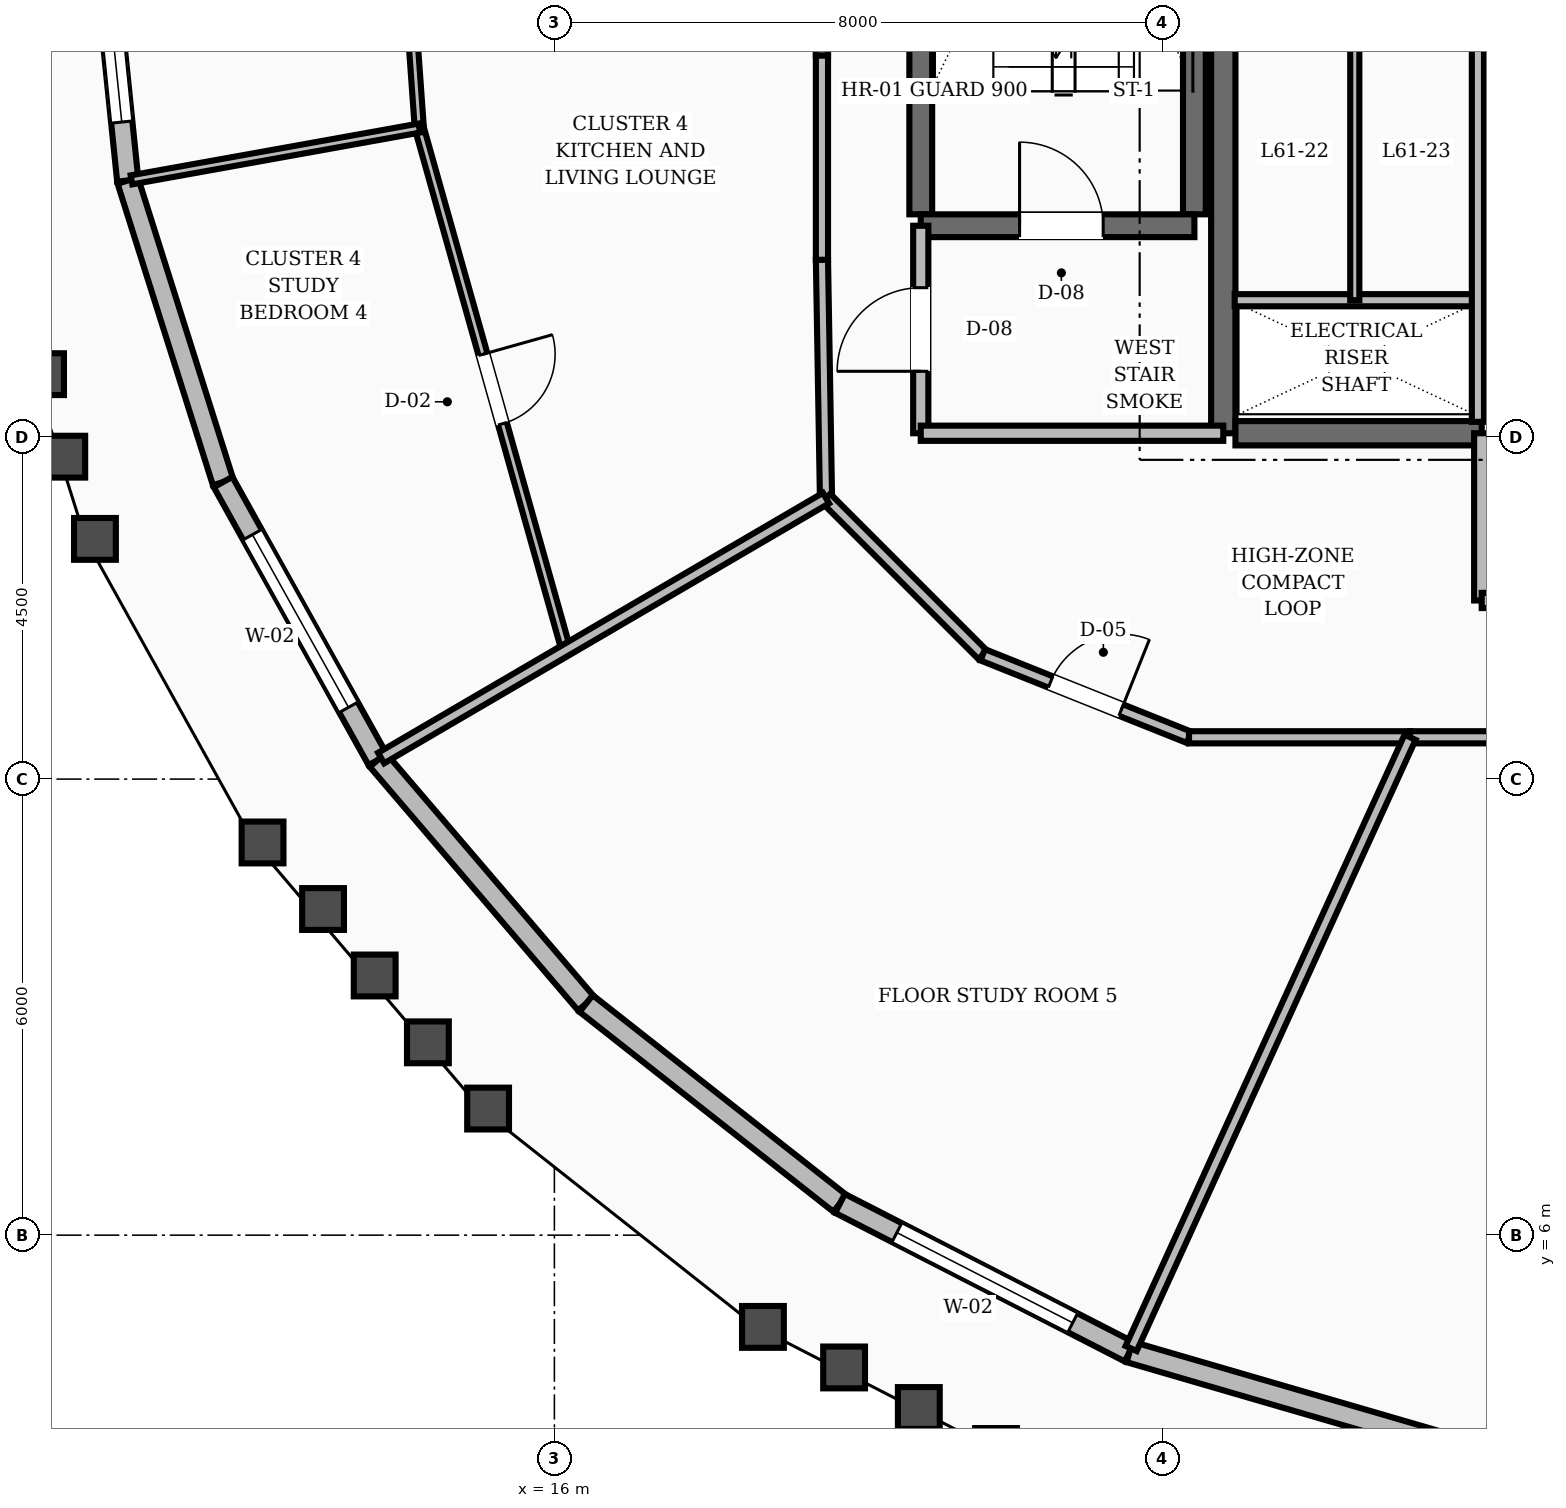
"""IFC4 building model, lengths in metres.
Left out: names, types, materials, properties, quantities, classifications, styles, units other than length and angle.
Written with IfcOpenShell. Run it as: python <this file> out.ifc"""

import sys

from ifc_helpers import new_model, si_unit, direction, frame, frame_2d, origin, place, context, subcontext, project, spatial, rectangle, extrude, element, fill, save


model = new_model("IFC4")
c1 = context("Model", 3, precision=1e-05, world=origin(), true_north=direction((0.0, 1.0)))
c2 = subcontext(c1, "Body", "Model", "MODEL_VIEW")
j1 = project(units=[si_unit("LENGTHUNIT", "METRE"), si_unit("PLANEANGLEUNIT", "RADIAN")], contexts=[c1])
p1 = place(None, origin())
s1 = spatial("IfcSite", under=j1, at=p1, CompositionType="ELEMENT")
p2 = place(p1, origin())
s2 = spatial("IfcBuilding", under=s1, at=p2, CompositionType="ELEMENT")
p3 = place(p2, frame((0.0, 0.0, 236.4)))
s3 = spatial("IfcBuildingStorey", under=s2, at=p3, CompositionType="ELEMENT", Elevation=236.4)
p4 = place(p3, frame((24.8, 16.55, 0.0), z_axis=(0.0, 0.0, 1.0), x_axis=(0.0, 1.0, 0.0)))
e1 = element("IfcWall", 1, at=p4, inside=s3, PredefinedType="SHEAR", context=c2, shape_type="SweptSolid", body=[
    extrude(rectangle(XDim=6.3, YDim=0.32, at=frame_2d((3.15, 0.0))), origin(), (0.0, 0.0, 1.0), 3.6),
])
p5 = place(p3, frame((24.96, 16.55, 0.0), z_axis=(0.0, 0.0, 1.0), x_axis=(1.0, 0.0, 0.0)))
e2 = element("IfcWall", 2, at=p5, inside=s3, PredefinedType="SHEAR", context=c2, shape_type="SweptSolid", body=[
    extrude(rectangle(XDim=3.24, YDim=0.32, at=frame_2d((1.62, 0.0))), origin(), (0.0, 0.0, 1.0), 3.6),
])
for number, where, z_axis, x_axis in (
    (3, (20.82, 19.43, 0.0), (0.0, 0.0, 1.0), (0.0, 1.0, 0.0)),
    (4, (24.42, 19.43, 0.0), (0.0, 0.0, 1.0), (0.0, 1.0, 0.0)),
):
    element("IfcWall", number, at=place(p3, frame(where, z_axis=z_axis, x_axis=x_axis)), inside=s3, PredefinedType="SHEAR", context=c2, shape_type="SweptSolid", body=[
        extrude(rectangle(XDim=8.74, YDim=0.3, at=frame_2d((4.37, 0.0))), origin(), (0.0, 0.0, 1.0), 3.6),
    ])
p6 = place(p3, frame((20.82, 19.28, 0.0), z_axis=(0.0, 0.0, 1.0), x_axis=(1.0, 0.0, 0.0)))
e5 = element("IfcWall", 5, at=p6, inside=s3, PredefinedType="SHEAR", context=c2, shape_type="SweptSolid", body=[
    extrude(rectangle(XDim=3.6, YDim=0.3, at=frame_2d((1.8, 0.0))), origin(), (0.0, 0.0, 1.0), 3.6),
])
p7 = place(p6, frame((1.3, 0.0, 0.0)))
e6 = element("IfcOpeningElement", 6, at=p7, cuts=e5, PredefinedType="OPENING", context=c2, shape_type="SweptSolid", body=[
    extrude(rectangle(XDim=1.1, YDim=2.1, at=frame_2d((0.55, 1.05))), frame((0.0, 0.16, 0.0), z_axis=(0.0, -1.0, 0.0), x_axis=(1.0, 0.0, 0.0)), (0.0, 0.0, 1.0), 0.32),
])
p8 = place(p3, frame((9.964, 24.0, 0.0), z_axis=(0.0, 0.0, 1.0), x_axis=(0.102137908712, -0.994770248652, 0.0)))
e7 = element("IfcWall", 7, at=p8, inside=s3, PredefinedType="STANDARD", context=c2, shape_type="SweptSolid", body=[
    extrude(rectangle(XDim=4.147, YDim=0.28, at=frame_2d((2.074, 0.0))), origin(), (0.0, 0.0, 1.0), 2.88),
])
p9 = place(p8, frame((0.773, 0.0, 0.8)))
e8 = element("IfcOpeningElement", 8, at=p9, cuts=e7, PredefinedType="OPENING", context=c2, shape_type="SweptSolid", body=[
    extrude(rectangle(XDim=2.6, YDim=1.65, at=frame_2d((1.3, 0.825))), frame((0.0, 0.15, 0.0), z_axis=(0.0, -1.0, 0.0), x_axis=(1.0, 0.0, 0.0)), (0.0, 0.0, 1.0), 0.3),
])
p10 = place(p3, frame((10.387, 19.875, 0.0), z_axis=(0.0, 0.0, 1.0), x_axis=(0.301400977057, -0.953497483494, 0.0)))
e9 = element("IfcWall", 9, at=p10, inside=s3, PredefinedType="STANDARD", context=c2, shape_type="SweptSolid", body=[
    extrude(rectangle(XDim=4.16, YDim=0.28, at=frame_2d((2.08, 0.0))), origin(), (0.0, 0.0, 1.0), 2.88),
])
p11 = place(p3, frame((11.641, 15.908, 0.0), z_axis=(0.0, 0.0, 1.0), x_axis=(0.486628377496, -0.873609078602, 0.0)))
e10 = element("IfcWall", 10, at=p11, inside=s3, PredefinedType="STANDARD", context=c2, shape_type="SweptSolid", body=[
    extrude(rectangle(XDim=4.185, YDim=0.28, at=frame_2d((2.092, 0.0))), origin(), (0.0, 0.0, 1.0), 2.88),
])
p12 = place(p11, frame((0.792, 0.0, 0.8)))
e11 = element("IfcOpeningElement", 11, at=p12, cuts=e10, PredefinedType="OPENING", context=c2, shape_type="SweptSolid", body=[
    extrude(rectangle(XDim=2.6, YDim=1.65, at=frame_2d((1.3, 0.825))), frame((0.0, 0.15, 0.0), z_axis=(0.0, -1.0, 0.0), x_axis=(1.0, 0.0, 0.0)), (0.0, 0.0, 1.0), 0.3),
])
p13 = place(p3, frame((13.677, 12.252, 0.0), z_axis=(0.0, 0.0, 1.0), x_axis=(0.64992790189, -0.759995869952, 0.0)))
e12 = element("IfcWall", 12, at=p13, inside=s3, PredefinedType="STANDARD", context=c2, shape_type="SweptSolid", body=[
    extrude(rectangle(XDim=4.217, YDim=0.28, at=frame_2d((2.108, 0.0))), origin(), (0.0, 0.0, 1.0), 2.88),
])
p14 = place(p3, frame((16.418, 9.047, 0.0), z_axis=(0.0, 0.0, 1.0), x_axis=(0.78564818009, -0.618673530322, 0.0)))
e13 = element("IfcWall", 13, at=p14, inside=s3, PredefinedType="STANDARD", context=c2, shape_type="SweptSolid", body=[
    extrude(rectangle(XDim=4.25, YDim=0.28, at=frame_2d((2.125, 0.0))), origin(), (0.0, 0.0, 1.0), 2.88),
])
p15 = place(p3, frame((19.757, 6.418, 0.0), z_axis=(0.0, 0.0, 1.0), x_axis=(0.889784216581, -0.456381471933, 0.0)))
e14 = element("IfcWall", 14, at=p15, inside=s3, PredefinedType="STANDARD", context=c2, shape_type="SweptSolid", body=[
    extrude(rectangle(XDim=4.282, YDim=0.28, at=frame_2d((2.141, 0.0))), origin(), (0.0, 0.0, 1.0), 2.88),
])
p16 = place(p15, frame((0.841, 0.0, 0.8)))
e15 = element("IfcOpeningElement", 15, at=p16, cuts=e14, PredefinedType="OPENING", context=c2, shape_type="SweptSolid", body=[
    extrude(rectangle(XDim=2.6, YDim=1.65, at=frame_2d((1.3, 0.825))), frame((0.0, 0.15, 0.0), z_axis=(0.0, -1.0, 0.0), x_axis=(1.0, 0.0, 0.0)), (0.0, 0.0, 1.0), 0.3),
])
p17 = place(p3, frame((23.567, 4.464, 0.0), z_axis=(0.0, 0.0, 1.0), x_axis=(0.960144675866, -0.279503490866, 0.0)))
e16 = element("IfcWall", 16, at=p17, inside=s3, PredefinedType="STANDARD", context=c2, shape_type="SweptSolid", body=[
    extrude(rectangle(XDim=4.305, YDim=0.28, at=frame_2d((2.153, 0.0))), origin(), (0.0, 0.0, 1.0), 2.88),
])
p18 = place(p3, frame((20.82, 16.55, 0.0), z_axis=(0.0, 0.0, 1.0), x_axis=(0.0, 1.0, 0.0)))
e17 = element("IfcWall", 17, at=p18, inside=s3, PredefinedType="SOLIDWALL", context=c2, shape_type="SweptSolid", body=[
    extrude(rectangle(XDim=2.73, YDim=0.2, at=frame_2d((1.365, 0.0))), origin(), (0.0, 0.0, 1.0), 2.87),
])
p19 = place(p18, frame((0.815, 0.0, 0.0)))
e18 = element("IfcOpeningElement", 18, at=p19, cuts=e17, PredefinedType="OPENING", context=c2, shape_type="SweptSolid", body=[
    extrude(rectangle(XDim=1.1, YDim=2.1, at=frame_2d((0.55, 1.05))), frame((0.0, 0.11, 0.0), z_axis=(0.0, -1.0, 0.0), x_axis=(1.0, 0.0, 0.0)), (0.0, 0.0, 1.0), 0.22),
])
p20 = place(p3, frame((20.82, 16.55, 0.0), z_axis=(0.0, 0.0, 1.0), x_axis=(1.0, 0.0, 0.0)))
e19 = element("IfcWall", 19, at=p20, inside=s3, PredefinedType="SOLIDWALL", context=c2, shape_type="SweptSolid", body=[
    extrude(rectangle(XDim=3.98, YDim=0.2, at=frame_2d((1.99, 0.0))), origin(), (0.0, 0.0, 1.0), 2.87),
])
p21 = place(p3, frame((28.2, 14.35, 0.0), z_axis=(0.0, 0.0, 1.0), x_axis=(0.0, 1.0, 0.0)))
e20 = element("IfcWall", 20, at=p21, inside=s3, PredefinedType="SOLIDWALL", context=c2, shape_type="SweptSolid", body=[
    extrude(rectangle(XDim=2.2, YDim=0.2, at=frame_2d((1.1, 0.0))), origin(), (0.0, 0.0, 1.0), 2.87),
])
p22 = place(p3, frame((28.2, 14.35, 0.0), z_axis=(0.0, 0.0, 1.0), x_axis=(1.0, 0.0, 0.0)))
e21 = element("IfcWall", 21, at=p22, inside=s3, PredefinedType="SOLIDWALL", context=c2, shape_type="SweptSolid", body=[
    extrude(rectangle(XDim=7.6, YDim=0.2, at=frame_2d((3.8, 0.0))), origin(), (0.0, 0.0, 1.0), 2.87),
])
p23 = place(p22, frame((3.2, 0.0, 0.0)))
e22 = element("IfcOpeningElement", 22, at=p23, cuts=e21, PredefinedType="OPENING", context=c2, shape_type="SweptSolid", body=[
    extrude(rectangle(XDim=1.2, YDim=2.1, at=frame_2d((0.6, 1.05))), frame((0.0, 0.11, 0.0), z_axis=(0.0, -1.0, 0.0), x_axis=(1.0, 0.0, 0.0)), (0.0, 0.0, 1.0), 0.22),
])
p24 = place(p3, frame((24.95, 18.3, 0.0), z_axis=(0.0, 0.0, 1.0), x_axis=(1.0, 0.0, 0.0)))
e23 = element("IfcWall", 23, at=p24, inside=s3, PredefinedType="SOLIDWALL", context=c2, shape_type="SweptSolid", body=[
    extrude(rectangle(XDim=3.2, YDim=0.16, at=frame_2d((1.6, 0.0))), origin(), (0.0, 0.0, 1.0), 2.87),
])
p25 = place(p3, frame((28.15, 16.7, 0.0), z_axis=(0.0, 0.0, 1.0), x_axis=(0.0, 1.0, 0.0)))
e24 = element("IfcWall", 24, at=p25, inside=s3, PredefinedType="SOLIDWALL", context=c2, shape_type="SweptSolid", body=[
    extrude(rectangle(XDim=6.05, YDim=0.16, at=frame_2d((3.025, 0.0))), origin(), (0.0, 0.0, 1.0), 2.87),
])
p26 = place(p3, frame((26.53, 18.3, 0.0), z_axis=(0.0, 0.0, 1.0), x_axis=(0.0, 1.0, 0.0)))
e25 = element("IfcWall", 25, at=p26, inside=s3, PredefinedType="PARTITIONING", context=c2, shape_type="SweptSolid", body=[
    extrude(rectangle(XDim=4.45, YDim=0.12, at=frame_2d((2.225, 0.0))), origin(), (0.0, 0.0, 1.0), 2.87),
])
p27 = place(p3, frame((19.52, 24.0, 0.0), z_axis=(0.0, 0.0, 1.0), x_axis=(0.0, -1.0, 0.0)))
e26 = element("IfcWall", 26, at=p27, inside=s3, PredefinedType="SOLIDWALL", context=c2, shape_type="SweptSolid", body=[
    extrude(rectangle(XDim=2.482, YDim=0.16, at=frame_2d((1.241, 0.0))), origin(), (0.0, 0.0, 1.0), 2.87),
])
p28 = place(p3, frame((19.52, 21.518, 0.0), z_axis=(0.0, 0.0, 1.0), x_axis=(0.0, -1.0, 0.0)))
e27 = element("IfcWall", 27, at=p28, inside=s3, PredefinedType="SOLIDWALL", context=c2, shape_type="SweptSolid", body=[
    extrude(rectangle(XDim=2.687, YDim=0.16, at=frame_2d((1.344, 0.0))), origin(), (0.0, 0.0, 1.0), 2.87),
])
p29 = place(p3, frame((19.52, 18.831, 0.0), z_axis=(0.0, 0.0, 1.0), x_axis=(0.016981035134, -0.999855811828, 0.0)))
e28 = element("IfcWall", 28, at=p29, inside=s3, PredefinedType="SOLIDWALL", context=c2, shape_type="SweptSolid", body=[
    extrude(rectangle(XDim=3.134, YDim=0.16, at=frame_2d((1.567, 0.0))), origin(), (0.0, 0.0, 1.0), 2.87),
])
p30 = place(p3, frame((19.573, 15.697, 0.0), z_axis=(0.0, 0.0, 1.0), x_axis=(0.707106781187, -0.707106781187, 0.0)))
e29 = element("IfcWall", 29, at=p30, inside=s3, PredefinedType="SOLIDWALL", context=c2, shape_type="SweptSolid", body=[
    extrude(rectangle(XDim=2.916, YDim=0.16, at=frame_2d((1.458, 0.0))), origin(), (0.0, 0.0, 1.0), 2.87),
])
p31 = place(p3, frame((21.635, 13.635, 0.0), z_axis=(0.0, 0.0, 1.0), x_axis=(0.92856882165, -0.371160266542, 0.0)))
e30 = element("IfcWall", 30, at=p31, inside=s3, PredefinedType="SOLIDWALL", context=c2, shape_type="SweptSolid", body=[
    extrude(rectangle(XDim=2.923, YDim=0.16, at=frame_2d((1.461, 0.0))), origin(), (0.0, 0.0, 1.0), 2.87),
])
p32 = place(p31, frame((0.962, 0.0, 0.0)))
e31 = element("IfcOpeningElement", 31, at=p32, cuts=e30, PredefinedType="OPENING", context=c2, shape_type="SweptSolid", body=[
    extrude(rectangle(XDim=1.0, YDim=2.1, at=frame_2d((0.5, 1.05))), frame((0.0, 0.09, 0.0), z_axis=(0.0, -1.0, 0.0), x_axis=(1.0, 0.0, 0.0)), (0.0, 0.0, 1.0), 0.18),
])
p33 = place(p3, frame((24.349, 12.55, 0.0), z_axis=(0.0, 0.0, 1.0), x_axis=(1.0, 0.0, 0.0)))
e32 = element("IfcWall", 32, at=p33, inside=s3, PredefinedType="SOLIDWALL", context=c2, shape_type="SweptSolid", body=[
    extrude(rectangle(XDim=2.908, YDim=0.16, at=frame_2d((1.454, 0.0))), origin(), (0.0, 0.0, 1.0), 2.87),
])
p34 = place(p3, frame((27.257, 12.55, 0.0), z_axis=(0.0, 0.0, 1.0), x_axis=(1.0, 0.0, 0.0)))
e33 = element("IfcWall", 33, at=p34, inside=s3, PredefinedType="SOLIDWALL", context=c2, shape_type="SweptSolid", body=[
    extrude(rectangle(XDim=2.465, YDim=0.16, at=frame_2d((1.232, 0.0))), origin(), (0.0, 0.0, 1.0), 2.87),
])
p35 = place(p3, frame((13.977, 24.0, 0.0), z_axis=(0.0, 0.0, 1.0), x_axis=(0.071312539547, -0.997454019844, 0.0)))
e34 = element("IfcWall", 34, at=p35, inside=s3, PredefinedType="PARTITIONING", context=c2, shape_type="SweptSolid", body=[
    extrude(rectangle(XDim=3.444, YDim=0.12, at=frame_2d((1.722, 0.0))), origin(), (0.0, 0.0, 1.0), 2.87),
])
p36 = place(p35, frame((1.247, 0.0, 0.0)))
e35 = element("IfcOpeningElement", 35, at=p36, cuts=e34, PredefinedType="OPENING", context=c2, shape_type="SweptSolid", body=[
    extrude(rectangle(XDim=0.95, YDim=2.1, at=frame_2d((0.475, 1.05))), frame((0.0, 0.07, 0.0), z_axis=(0.0, -1.0, 0.0), x_axis=(1.0, 0.0, 0.0)), (0.0, 0.0, 1.0), 0.14),
])
p37 = place(p3, frame((14.223, 20.565, 0.0), z_axis=(0.0, 0.0, 1.0), x_axis=(0.270726742506, -0.962656237134, 0.0)))
e36 = element("IfcWall", 36, at=p37, inside=s3, PredefinedType="PARTITIONING", context=c2, shape_type="SweptSolid", body=[
    extrude(rectangle(XDim=7.132, YDim=0.12, at=frame_2d((3.566, 0.0))), origin(), (0.0, 0.0, 1.0), 2.87),
])
p38 = place(p37, frame((3.091, 0.0, 0.0)))
e37 = element("IfcOpeningElement", 37, at=p38, cuts=e36, PredefinedType="OPENING", context=c2, shape_type="SweptSolid", body=[
    extrude(rectangle(XDim=0.95, YDim=2.1, at=frame_2d((0.475, 1.05))), frame((0.0, 0.07, 0.0), z_axis=(0.0, -1.0, 0.0), x_axis=(1.0, 0.0, 0.0)), (0.0, 0.0, 1.0), 0.14),
])
p39 = place(p3, frame((14.223, 20.565, 0.0), z_axis=(0.0, 0.0, 1.0), x_axis=(-0.984203232283, -0.177042360933, 0.0)))
e38 = element("IfcWall", 38, at=p39, inside=s3, PredefinedType="PARTITIONING", context=c2, shape_type="SweptSolid", body=[
    extrude(rectangle(XDim=3.847, YDim=0.12, at=frame_2d((1.924, 0.0))), origin(), (0.0, 0.0, 1.0), 2.87),
])
p40 = place(p3, frame((19.573, 15.697, 0.0), z_axis=(0.0, 0.0, 1.0), x_axis=(-0.863412899141, -0.504497934185, 0.0)))
e39 = element("IfcWall", 39, at=p40, inside=s3, PredefinedType="SOLIDWALL", context=c2, shape_type="SweptSolid", body=[
    extrude(rectangle(XDim=6.778, YDim=0.16, at=frame_2d((3.389, 0.0))), origin(), (0.0, 0.0, 1.0), 2.87),
])
p41 = place(p3, frame((27.257, 12.55, 0.0), z_axis=(0.0, 0.0, 1.0), x_axis=(-0.415155197437, -0.909750604309, 0.0)))
e40 = element("IfcWall", 40, at=p41, inside=s3, PredefinedType="SOLIDWALL", context=c2, shape_type="SweptSolid", body=[
    extrude(rectangle(XDim=8.839, YDim=0.16, at=frame_2d((4.419, 0.0))), origin(), (0.0, 0.0, 1.0), 2.87),
])
p42 = place(p9, origin())
e41 = element("IfcWindow", 41, at=p42, inside=s3, PartitioningType="SINGLE_PANEL", PredefinedType="WINDOW", context=c2, shape_type="SweptSolid", body=[
    extrude(rectangle(XDim=2.6, YDim=1.65, at=frame_2d((1.3, 0.825))), frame((0.0, 0.03, 0.0), z_axis=(0.0, -1.0, 0.0), x_axis=(1.0, 0.0, 0.0)), (0.0, 0.0, 1.0), 0.06),
])
fill(e8, e41)
p43 = place(p12, origin())
e42 = element("IfcWindow", 42, at=p43, inside=s3, PartitioningType="SINGLE_PANEL", PredefinedType="WINDOW", context=c2, shape_type="SweptSolid", body=[
    extrude(rectangle(XDim=2.6, YDim=1.65, at=frame_2d((1.3, 0.825))), frame((0.0, 0.03, 0.0), z_axis=(0.0, -1.0, 0.0), x_axis=(1.0, 0.0, 0.0)), (0.0, 0.0, 1.0), 0.06),
])
fill(e11, e42)
p44 = place(p16, origin())
e43 = element("IfcWindow", 43, at=p44, inside=s3, PartitioningType="SINGLE_PANEL", PredefinedType="WINDOW", context=c2, shape_type="SweptSolid", body=[
    extrude(rectangle(XDim=2.6, YDim=1.65, at=frame_2d((1.3, 0.825))), frame((0.0, 0.03, 0.0), z_axis=(0.0, -1.0, 0.0), x_axis=(1.0, 0.0, 0.0)), (0.0, 0.0, 1.0), 0.06),
])
fill(e15, e43)
p45 = place(p7, origin())
e44 = element("IfcDoor", 44, at=p45, inside=s3, OperationType="SINGLE_SWING_LEFT", PredefinedType="DOOR", context=c2, shape_type="SweptSolid", body=[
    extrude(rectangle(XDim=1.1, YDim=2.1, at=frame_2d((0.55, 1.05))), frame((0.0, 0.025, 0.0), z_axis=(0.0, -1.0, 0.0), x_axis=(1.0, 0.0, 0.0)), (0.0, 0.0, 1.0), 0.05),
])
fill(e6, e44)
p46 = place(p19, origin())
e45 = element("IfcDoor", 45, at=p46, inside=s3, OperationType="SINGLE_SWING_LEFT", PredefinedType="DOOR", context=c2, shape_type="SweptSolid", body=[
    extrude(rectangle(XDim=1.1, YDim=2.1, at=frame_2d((0.55, 1.05))), frame((0.0, 0.025, 0.0), z_axis=(0.0, -1.0, 0.0), x_axis=(1.0, 0.0, 0.0)), (0.0, 0.0, 1.0), 0.05),
])
fill(e18, e45)
p47 = place(p38, origin())
e46 = element("IfcDoor", 46, at=p47, inside=s3, OperationType="SINGLE_SWING_LEFT", PredefinedType="DOOR", context=c2, shape_type="SweptSolid", body=[
    extrude(rectangle(XDim=0.95, YDim=2.1, at=frame_2d((0.475, 1.05))), frame((0.0, 0.025, 0.0), z_axis=(0.0, -1.0, 0.0), x_axis=(1.0, 0.0, 0.0)), (0.0, 0.0, 1.0), 0.05),
])
fill(e37, e46)
p48 = place(p32, origin())
e47 = element("IfcDoor", 47, at=p48, inside=s3, OperationType="SINGLE_SWING_RIGHT", PredefinedType="DOOR", context=c2, shape_type="SweptSolid", body=[
    extrude(rectangle(XDim=1.0, YDim=2.1, at=frame_2d((0.5, 1.05))), frame((0.0, 0.025, 0.0), z_axis=(0.0, -1.0, 0.0), x_axis=(1.0, 0.0, 0.0)), (0.0, 0.0, 1.0), 0.05),
])
fill(e31, e47)
save(model, sys.argv[1])
